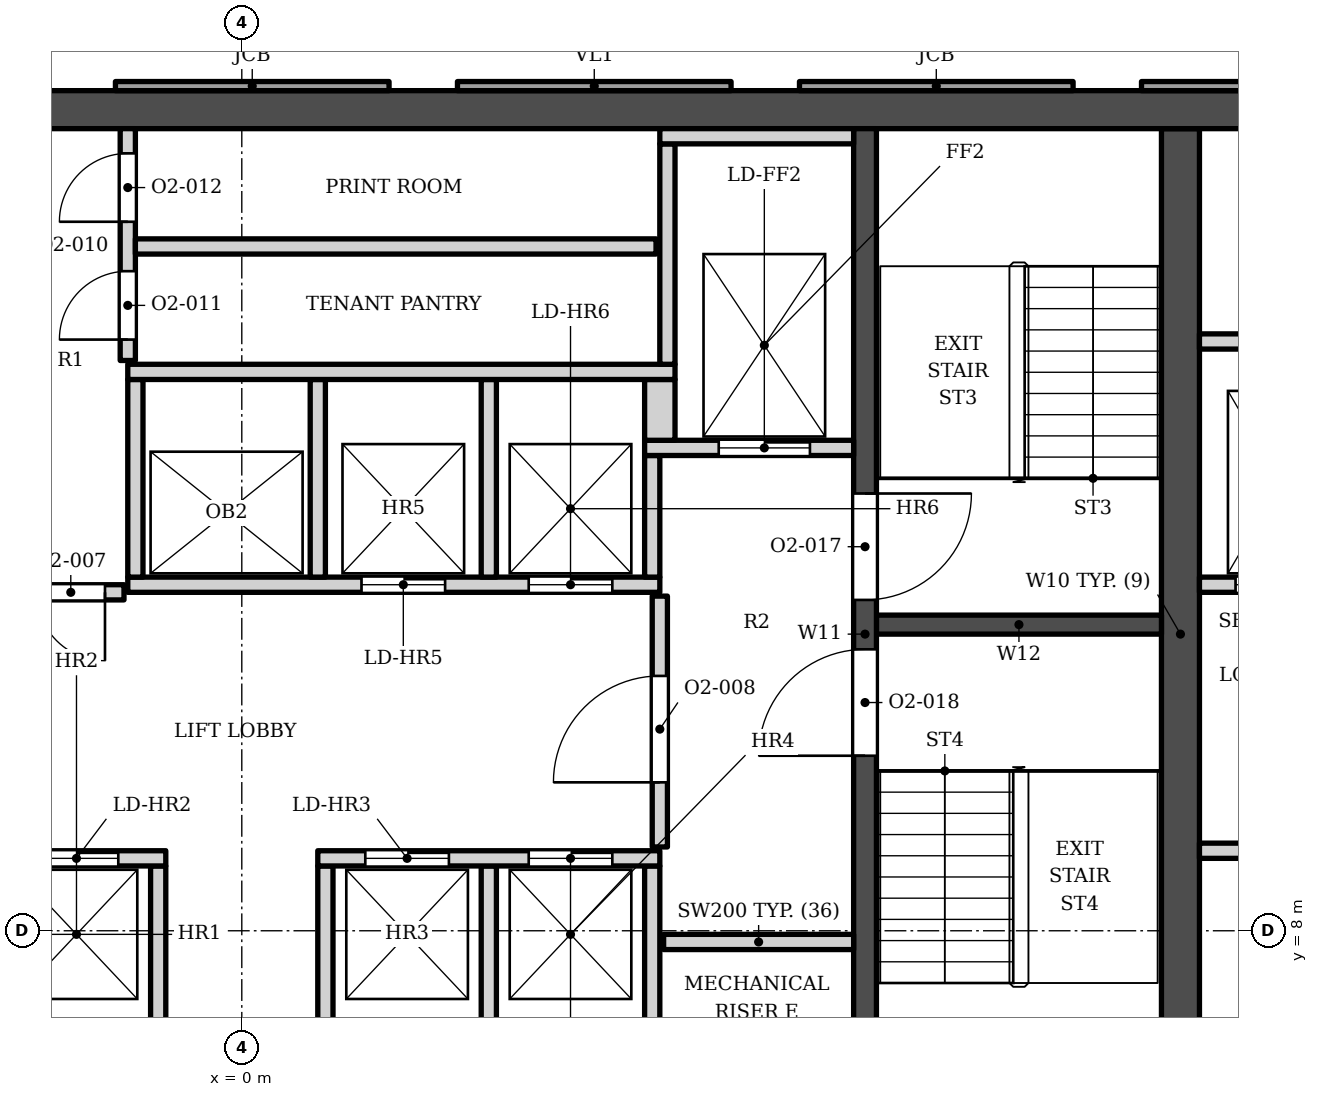
"""IFC4 building model, lengths in metres.
Left out: names, types, materials, properties, quantities, classifications, styles, units other than length and angle.
Written with IfcOpenShell. Run it as: python <this file> out.ifc"""

import sys

from ifc_helpers import new_model, si_unit, direction, frame, frame_2d, origin, place, context, subcontext, project, spatial, polyline, rectangle, outline, extrude, element, fill, save


model = new_model("IFC4")
c1 = context("Model", 3, precision=1e-05, world=origin(), true_north=direction((0.0, 1.0)))
c2 = subcontext(c1, "Body", "Model", "MODEL_VIEW")
j1 = project(units=[si_unit("LENGTHUNIT", "METRE"), si_unit("PLANEANGLEUNIT", "RADIAN")], contexts=[c1])
p1 = place(None, origin())
s1 = spatial("IfcSite", under=j1, at=p1, CompositionType="ELEMENT")
p2 = place(p1, origin())
s2 = spatial("IfcBuilding", under=s1, at=p2, CompositionType="ELEMENT")
p3 = place(p2, frame((0.0, 0.0, 156.3)))
s3 = spatial("IfcBuildingStorey", under=s2, at=p3, CompositionType="ELEMENT", Elevation=156.3)
p4 = place(p3, frame((-15.1, 18.802, 0.0), z_axis=(0.0, 0.0, 1.0), x_axis=(1.0, 0.0, 0.0)))
e1 = element("IfcWall", 1, at=p4, inside=s3, PredefinedType="SHEAR", context=c2, shape_type="SweptSolid", body=[
    extrude(rectangle(XDim=30.2, YDim=0.5, at=frame_2d((15.1, 0.0))), origin(), (0.0, 0.0, 1.0), 3.9),
])
p5 = place(p3, frame((12.35, 5.253, 0.0), z_axis=(0.0, 0.0, 1.0), x_axis=(0.0, 1.0, 0.0)))
e2 = element("IfcWall", 2, at=p5, inside=s3, PredefinedType="SHEAR", context=c2, shape_type="SweptSolid", body=[
    extrude(rectangle(XDim=13.3, YDim=0.5, at=frame_2d((6.65, 0.0))), origin(), (0.0, 0.0, 1.0), 3.9),
])
p6 = place(p3, frame((8.2, 5.253, 0.0), z_axis=(0.0, 0.0, 1.0), x_axis=(0.0, 1.0, 0.0)))
e3 = element("IfcWall", 3, at=p6, inside=s3, PredefinedType="SHEAR", context=c2, shape_type="SweptSolid", body=[
    extrude(rectangle(XDim=13.3, YDim=0.3, at=frame_2d((6.65, 0.0))), origin(), (0.0, 0.0, 1.0), 3.9),
])
p7 = place(p6, frame((7.1, 0.0, 0.0)))
e4 = element("IfcOpeningElement", 4, at=p7, cuts=e3, PredefinedType="OPENING", context=c2, shape_type="SweptSolid", body=[
    extrude(rectangle(XDim=1.4, YDim=2.1, at=frame_2d((0.7, 1.05))), frame((0.0, 0.16, 0.0), z_axis=(0.0, -1.0, 0.0), x_axis=(1.0, 0.0, 0.0)), (0.0, 0.0, 1.0), 0.32),
])
p8 = place(p6, frame((5.05, 0.0, 0.0)))
e5 = element("IfcOpeningElement", 5, at=p8, cuts=e3, PredefinedType="OPENING", context=c2, shape_type="SweptSolid", body=[
    extrude(rectangle(XDim=1.4, YDim=2.1, at=frame_2d((0.7, 1.05))), frame((0.0, 0.16, 0.0), z_axis=(0.0, -1.0, 0.0), x_axis=(1.0, 0.0, 0.0)), (0.0, 0.0, 1.0), 0.32),
])
p9 = place(p3, frame((8.35, 12.028, 0.0), z_axis=(0.0, 0.0, 1.0), x_axis=(1.0, 0.0, 0.0)))
e6 = element("IfcWall", 6, at=p9, inside=s3, PredefinedType="SHEAR", context=c2, shape_type="SweptSolid", body=[
    extrude(rectangle(XDim=3.75, YDim=0.25, at=frame_2d((1.875, 0.0))), origin(), (0.0, 0.0, 1.0), 3.9),
])
p10 = place(p3, origin())
e7 = element("IfcWall", 7, at=p10, inside=s3, PredefinedType="ELEMENTEDWALL", context=c2, shape_type="SweptSolid", body=[
    extrude(outline(polyline([(11.837, 19.173), (11.837, 19.052), (15.437, 19.052), (15.437, 19.173), (11.837, 19.173)])), origin(), (0.0, 0.0, 1.0), 3.0),
])
p11 = place(p3, origin())
e8 = element("IfcWall", 8, at=p11, inside=s3, PredefinedType="SOLIDWALL", context=c2, shape_type="SweptSolid", body=[
    extrude(outline(polyline([(7.337, 19.173), (7.337, 19.052), (10.938, 19.052), (10.938, 19.173), (7.337, 19.173)])), origin(), (0.0, 0.0, 1.0), 3.0),
])
p12 = place(p3, origin())
e9 = element("IfcWall", 9, at=p12, inside=s3, PredefinedType="ELEMENTEDWALL", context=c2, shape_type="SweptSolid", body=[
    extrude(outline(polyline([(2.837, 19.173), (2.837, 19.052), (6.438, 19.052), (6.438, 19.173), (2.837, 19.173)])), origin(), (0.0, 0.0, 1.0), 3.0),
])
p13 = place(p3, origin())
e10 = element("IfcWall", 10, at=p13, inside=s3, PredefinedType="SOLIDWALL", context=c2, shape_type="SweptSolid", body=[
    extrude(outline(polyline([(-1.663, 19.173), (-1.663, 19.052), (1.938, 19.052), (1.938, 19.173), (-1.663, 19.173)])), origin(), (0.0, 0.0, 1.0), 3.0),
])
for number, where, z_axis, x_axis in (
    (11, (-1.1, 6.353, 0.0), (0.0, 0.0, 1.0), (0.0, 1.0, 0.0)),
    (12, (1.1, 6.353, 0.0), (0.0, 0.0, 1.0), (0.0, 1.0, 0.0)),
    (13, (3.25, 6.353, 0.0), (0.0, 0.0, 1.0), (0.0, 1.0, 0.0)),
    (14, (5.4, 6.353, 0.0), (0.0, 0.0, 1.0), (0.0, 1.0, 0.0)),
    (15, (5.55, 7.853, 0.0), (0.0, 0.0, 1.0), (1.0, 0.0, 0.0)),
):
    element("IfcWall", number, at=place(p3, frame(where, z_axis=z_axis, x_axis=x_axis)), inside=s3, PredefinedType="SOLIDWALL", context=c2, shape_type="SweptSolid", body=[
        extrude(rectangle(XDim=2.5, YDim=0.2, at=frame_2d((1.25, 0.0))), origin(), (0.0, 0.0, 1.0), 3.73),
    ])
p14 = place(p3, frame((-5.5, 8.953, 0.0), z_axis=(0.0, 0.0, 1.0), x_axis=(1.0, 0.0, 0.0)))
e16 = element("IfcWall", 16, at=p14, inside=s3, PredefinedType="SOLIDWALL", context=c2, shape_type="SweptSolid", body=[
    extrude(rectangle(XDim=4.5, YDim=0.2, at=frame_2d((2.25, 0.0))), origin(), (0.0, 0.0, 1.0), 3.73),
])
p15 = place(p14, frame((0.625, 0.0, 0.0)))
e17 = element("IfcOpeningElement", 17, at=p15, cuts=e16, PredefinedType="OPENING", context=c2, shape_type="SweptSolid", body=[
    extrude(rectangle(XDim=1.1, YDim=2.1, at=frame_2d((0.55, 1.05))), frame((0.0, 0.11, 0.0), z_axis=(0.0, -1.0, 0.0), x_axis=(1.0, 0.0, 0.0)), (0.0, 0.0, 1.0), 0.22),
])
p16 = place(p14, frame((2.775, 0.0, 0.0)))
e18 = element("IfcOpeningElement", 18, at=p16, cuts=e16, PredefinedType="OPENING", context=c2, shape_type="SweptSolid", body=[
    extrude(rectangle(XDim=1.1, YDim=2.1, at=frame_2d((0.55, 1.05))), frame((0.0, 0.11, 0.0), z_axis=(0.0, -1.0, 0.0), x_axis=(1.0, 0.0, 0.0)), (0.0, 0.0, 1.0), 0.22),
])
p17 = place(p3, frame((1.0, 8.953, 0.0), z_axis=(0.0, 0.0, 1.0), x_axis=(1.0, 0.0, 0.0)))
e19 = element("IfcWall", 19, at=p17, inside=s3, PredefinedType="SOLIDWALL", context=c2, shape_type="SweptSolid", body=[
    extrude(rectangle(XDim=4.5, YDim=0.2, at=frame_2d((2.25, 0.0))), origin(), (0.0, 0.0, 1.0), 3.73),
])
p18 = place(p17, frame((0.625, 0.0, 0.0)))
e20 = element("IfcOpeningElement", 20, at=p18, cuts=e19, PredefinedType="OPENING", context=c2, shape_type="SweptSolid", body=[
    extrude(rectangle(XDim=1.1, YDim=2.1, at=frame_2d((0.55, 1.05))), frame((0.0, 0.11, 0.0), z_axis=(0.0, -1.0, 0.0), x_axis=(1.0, 0.0, 0.0)), (0.0, 0.0, 1.0), 0.22),
])
p19 = place(p17, frame((2.775, 0.0, 0.0)))
e21 = element("IfcOpeningElement", 21, at=p19, cuts=e19, PredefinedType="OPENING", context=c2, shape_type="SweptSolid", body=[
    extrude(rectangle(XDim=1.1, YDim=2.1, at=frame_2d((0.55, 1.05))), frame((0.0, 0.11, 0.0), z_axis=(0.0, -1.0, 0.0), x_axis=(1.0, 0.0, 0.0)), (0.0, 0.0, 1.0), 0.22),
])
p20 = place(p3, frame((12.6, 9.052, 0.0), z_axis=(0.0, 0.0, 1.0), x_axis=(1.0, 0.0, 0.0)))
e22 = element("IfcWall", 22, at=p20, inside=s3, PredefinedType="PARTITIONING", context=c2, shape_type="SweptSolid", body=[
    extrude(rectangle(XDim=2.5, YDim=0.2, at=frame_2d((1.25, 0.0))), origin(), (0.0, 0.0, 1.0), 3.73),
])
p21 = place(p3, frame((5.5, 9.103, 0.0), z_axis=(0.0, 0.0, 1.0), x_axis=(0.0, 1.0, 0.0)))
e23 = element("IfcWall", 23, at=p21, inside=s3, PredefinedType="SOLIDWALL", context=c2, shape_type="SweptSolid", body=[
    extrude(rectangle(XDim=3.3, YDim=0.2, at=frame_2d((1.65, 0.0))), origin(), (0.0, 0.0, 1.0), 3.73),
])
p22 = place(p21, frame((0.85, 0.0, 0.0)))
e24 = element("IfcOpeningElement", 24, at=p22, cuts=e23, PredefinedType="OPENING", context=c2, shape_type="SweptSolid", body=[
    extrude(rectangle(XDim=1.4, YDim=2.1, at=frame_2d((0.7, 1.05))), frame((0.0, 0.11, 0.0), z_axis=(0.0, -1.0, 0.0), x_axis=(1.0, 0.0, 0.0)), (0.0, 0.0, 1.0), 0.22),
])
p23 = place(p3, frame((-2.95, 12.453, 0.0), z_axis=(0.0, 0.0, 1.0), x_axis=(1.0, 0.0, 0.0)))
e25 = element("IfcWall", 25, at=p23, inside=s3, PredefinedType="SOLIDWALL", context=c2, shape_type="SweptSolid", body=[
    extrude(rectangle(XDim=1.4, YDim=0.2, at=frame_2d((0.7, 0.0))), origin(), (0.0, 0.0, 1.0), 3.73),
])
p24 = place(p23, frame((0.25, 0.0, 0.0)))
e26 = element("IfcOpeningElement", 26, at=p24, cuts=e25, PredefinedType="OPENING", context=c2, shape_type="SweptSolid", body=[
    extrude(rectangle(XDim=0.9, YDim=2.1, at=frame_2d((0.45, 1.05))), frame((0.0, 0.11, 0.0), z_axis=(0.0, -1.0, 0.0), x_axis=(1.0, 0.0, 0.0)), (0.0, 0.0, 1.0), 0.22),
])
p25 = place(p3, frame((-1.5, 12.552, 0.0), z_axis=(0.0, 0.0, 1.0), x_axis=(1.0, 0.0, 0.0)))
e27 = element("IfcWall", 27, at=p25, inside=s3, PredefinedType="SOLIDWALL", context=c2, shape_type="SweptSolid", body=[
    extrude(rectangle(XDim=7.0, YDim=0.2, at=frame_2d((3.5, 0.0))), origin(), (0.0, 0.0, 1.0), 3.73),
])
p26 = place(p25, frame((3.075, 0.0, 0.0)))
e28 = element("IfcOpeningElement", 28, at=p26, cuts=e27, PredefinedType="OPENING", context=c2, shape_type="SweptSolid", body=[
    extrude(rectangle(XDim=1.1, YDim=2.1, at=frame_2d((0.55, 1.05))), frame((0.0, 0.11, 0.0), z_axis=(0.0, -1.0, 0.0), x_axis=(1.0, 0.0, 0.0)), (0.0, 0.0, 1.0), 0.22),
])
p27 = place(p25, frame((5.275, 0.0, 0.0)))
e29 = element("IfcOpeningElement", 29, at=p27, cuts=e27, PredefinedType="OPENING", context=c2, shape_type="SweptSolid", body=[
    extrude(rectangle(XDim=1.1, YDim=2.1, at=frame_2d((0.55, 1.05))), frame((0.0, 0.11, 0.0), z_axis=(0.0, -1.0, 0.0), x_axis=(1.0, 0.0, 0.0)), (0.0, 0.0, 1.0), 0.22),
])
p28 = place(p3, frame((12.6, 12.552, 0.0), z_axis=(0.0, 0.0, 1.0), x_axis=(1.0, 0.0, 0.0)))
e30 = element("IfcWall", 30, at=p28, inside=s3, PredefinedType="SOLIDWALL", context=c2, shape_type="SweptSolid", body=[
    extrude(rectangle(XDim=2.15, YDim=0.2, at=frame_2d((1.075, 0.0))), origin(), (0.0, 0.0, 1.0), 3.73),
])
p29 = place(p28, frame((0.475, 0.0, 0.0)))
e31 = element("IfcOpeningElement", 31, at=p29, cuts=e30, PredefinedType="OPENING", context=c2, shape_type="SweptSolid", body=[
    extrude(rectangle(XDim=1.2, YDim=2.1, at=frame_2d((0.6, 1.05))), frame((0.0, 0.11, 0.0), z_axis=(0.0, -1.0, 0.0), x_axis=(1.0, 0.0, 0.0)), (0.0, 0.0, 1.0), 0.22),
])
for number, where, z_axis, x_axis in (
    (32, (-1.4, 12.653, 0.0), (0.0, 0.0, 1.0), (0.0, 1.0, 0.0)),
    (33, (1.0, 12.653, 0.0), (0.0, 0.0, 1.0), (0.0, 1.0, 0.0)),
    (34, (3.25, 12.653, 0.0), (0.0, 0.0, 1.0), (0.0, 1.0, 0.0)),
):
    element("IfcWall", number, at=place(p3, frame(where, z_axis=z_axis, x_axis=x_axis)), inside=s3, PredefinedType="SOLIDWALL", context=c2, shape_type="SweptSolid", body=[
        extrude(rectangle(XDim=2.6, YDim=0.2, at=frame_2d((1.3, 0.0))), origin(), (0.0, 0.0, 1.0), 3.73),
    ])
p30 = place(p3, frame((5.4, 12.653, 0.0), z_axis=(0.0, 0.0, 1.0), x_axis=(0.0, 1.0, 0.0)))
e35 = element("IfcWall", 35, at=p30, inside=s3, PredefinedType="SOLIDWALL", context=c2, shape_type="SweptSolid", body=[
    extrude(rectangle(XDim=1.6, YDim=0.2, at=frame_2d((0.8, 0.0))), origin(), (0.0, 0.0, 1.0), 3.73),
])
p31 = place(p3, frame((5.3, 14.353, 0.0), z_axis=(0.0, 0.0, 1.0), x_axis=(1.0, 0.0, 0.0)))
e36 = element("IfcWall", 36, at=p31, inside=s3, PredefinedType="SOLIDWALL", context=c2, shape_type="SweptSolid", body=[
    extrude(rectangle(XDim=2.75, YDim=0.2, at=frame_2d((1.375, 0.0))), origin(), (0.0, 0.0, 1.0), 3.73),
])
p32 = place(p31, frame((0.975, 0.0, 0.0)))
e37 = element("IfcOpeningElement", 37, at=p32, cuts=e36, PredefinedType="OPENING", context=c2, shape_type="SweptSolid", body=[
    extrude(rectangle(XDim=1.2, YDim=2.1, at=frame_2d((0.6, 1.05))), frame((0.0, 0.11, 0.0), z_axis=(0.0, -1.0, 0.0), x_axis=(1.0, 0.0, 0.0)), (0.0, 0.0, 1.0), 0.22),
])
p33 = place(p3, frame((5.5, 14.453, 0.0), z_axis=(0.0, 0.0, 1.0), x_axis=(0.0, 1.0, 0.0)))
e38 = element("IfcWall", 38, at=p33, inside=s3, PredefinedType="SOLIDWALL", context=c2, shape_type="SweptSolid", body=[
    extrude(rectangle(XDim=0.8, YDim=0.4, at=frame_2d((0.4, 0.0))), origin(), (0.0, 0.0, 1.0), 3.73),
])
p34 = place(p3, frame((-1.5, 15.353, 0.0), z_axis=(0.0, 0.0, 1.0), x_axis=(1.0, 0.0, 0.0)))
e39 = element("IfcWall", 39, at=p34, inside=s3, PredefinedType="SOLIDWALL", context=c2, shape_type="SweptSolid", body=[
    extrude(rectangle(XDim=7.2, YDim=0.2, at=frame_2d((3.6, 0.0))), origin(), (0.0, 0.0, 1.0), 3.73),
])
p35 = place(p3, frame((5.6, 15.453, 0.0), z_axis=(0.0, 0.0, 1.0), x_axis=(0.0, 1.0, 0.0)))
e40 = element("IfcWall", 40, at=p35, inside=s3, PredefinedType="SOLIDWALL", context=c2, shape_type="SweptSolid", body=[
    extrude(rectangle(XDim=2.9, YDim=0.2, at=frame_2d((1.45, 0.0))), origin(), (0.0, 0.0, 1.0), 3.73),
])
p36 = place(p3, frame((-1.5, 15.503, 0.0), z_axis=(0.0, 0.0, 1.0), x_axis=(0.0, 1.0, 0.0)))
e41 = element("IfcWall", 41, at=p36, inside=s3, PredefinedType="SOLIDWALL", context=c2, shape_type="SweptSolid", body=[
    extrude(rectangle(XDim=3.05, YDim=0.2, at=frame_2d((1.525, 0.0))), origin(), (0.0, 0.0, 1.0), 3.73),
])
p37 = place(p36, frame((0.275, 0.0, 0.0)))
e42 = element("IfcOpeningElement", 42, at=p37, cuts=e41, PredefinedType="OPENING", context=c2, shape_type="SweptSolid", body=[
    extrude(rectangle(XDim=0.9, YDim=2.1, at=frame_2d((0.45, 1.05))), frame((0.0, 0.11, 0.0), z_axis=(0.0, -1.0, 0.0), x_axis=(1.0, 0.0, 0.0)), (0.0, 0.0, 1.0), 0.22),
])
p38 = place(p36, frame((1.825, 0.0, 0.0)))
e43 = element("IfcOpeningElement", 43, at=p38, cuts=e41, PredefinedType="OPENING", context=c2, shape_type="SweptSolid", body=[
    extrude(rectangle(XDim=0.9, YDim=2.1, at=frame_2d((0.45, 1.05))), frame((0.0, 0.11, 0.0), z_axis=(0.0, -1.0, 0.0), x_axis=(1.0, 0.0, 0.0)), (0.0, 0.0, 1.0), 0.22),
])
p39 = place(p3, frame((12.6, 15.753, 0.0), z_axis=(0.0, 0.0, 1.0), x_axis=(1.0, 0.0, 0.0)))
e44 = element("IfcWall", 44, at=p39, inside=s3, PredefinedType="SOLIDWALL", context=c2, shape_type="SweptSolid", body=[
    extrude(rectangle(XDim=2.15, YDim=0.2, at=frame_2d((1.075, 0.0))), origin(), (0.0, 0.0, 1.0), 3.73),
])
p40 = place(p3, frame((-1.4, 17.003, 0.0), z_axis=(0.0, 0.0, 1.0), x_axis=(1.0, 0.0, 0.0)))
e45 = element("IfcWall", 45, at=p40, inside=s3, PredefinedType="SOLIDWALL", context=c2, shape_type="SweptSolid", body=[
    extrude(rectangle(XDim=6.85, YDim=0.2, at=frame_2d((3.425, 0.0))), origin(), (0.0, 0.0, 1.0), 3.73),
])
p41 = place(p3, frame((5.5, 18.453, 0.0), z_axis=(0.0, 0.0, 1.0), x_axis=(1.0, 0.0, 0.0)))
e46 = element("IfcWall", 46, at=p41, inside=s3, PredefinedType="SOLIDWALL", context=c2, shape_type="SweptSolid", body=[
    extrude(rectangle(XDim=2.55, YDim=0.2, at=frame_2d((1.275, 0.0))), origin(), (0.0, 0.0, 1.0), 3.73),
])
p42 = place(p16, origin())
e47 = element("IfcDoor", 47, at=p42, inside=s3, OperationType="DOUBLE_DOOR_SLIDING", PredefinedType="DOOR", context=c2, shape_type="SweptSolid", body=[
    extrude(rectangle(XDim=1.1, YDim=2.1, at=frame_2d((0.55, 1.05))), frame((0.0, 0.025, 0.0), z_axis=(0.0, -1.0, 0.0), x_axis=(1.0, 0.0, 0.0)), (0.0, 0.0, 1.0), 0.05),
])
fill(e18, e47)
p43 = place(p18, origin())
e48 = element("IfcDoor", 48, at=p43, inside=s3, OperationType="DOUBLE_DOOR_SLIDING", PredefinedType="DOOR", context=c2, shape_type="SweptSolid", body=[
    extrude(rectangle(XDim=1.1, YDim=2.1, at=frame_2d((0.55, 1.05))), frame((0.0, 0.025, 0.0), z_axis=(0.0, -1.0, 0.0), x_axis=(1.0, 0.0, 0.0)), (0.0, 0.0, 1.0), 0.05),
])
fill(e20, e48)
p44 = place(p19, origin())
e49 = element("IfcDoor", 49, at=p44, inside=s3, OperationType="DOUBLE_DOOR_SLIDING", PredefinedType="DOOR", context=c2, shape_type="SweptSolid", body=[
    extrude(rectangle(XDim=1.1, YDim=2.1, at=frame_2d((0.55, 1.05))), frame((0.0, 0.025, 0.0), z_axis=(0.0, -1.0, 0.0), x_axis=(1.0, 0.0, 0.0)), (0.0, 0.0, 1.0), 0.05),
])
fill(e21, e49)
p45 = place(p26, origin())
e50 = element("IfcDoor", 50, at=p45, inside=s3, OperationType="DOUBLE_DOOR_SLIDING", PredefinedType="DOOR", context=c2, shape_type="SweptSolid", body=[
    extrude(rectangle(XDim=1.1, YDim=2.1, at=frame_2d((0.55, 1.05))), frame((0.0, 0.025, 0.0), z_axis=(0.0, -1.0, 0.0), x_axis=(1.0, 0.0, 0.0)), (0.0, 0.0, 1.0), 0.05),
])
fill(e28, e50)
p46 = place(p27, origin())
e51 = element("IfcDoor", 51, at=p46, inside=s3, OperationType="DOUBLE_DOOR_SLIDING", PredefinedType="DOOR", context=c2, shape_type="SweptSolid", body=[
    extrude(rectangle(XDim=1.1, YDim=2.1, at=frame_2d((0.55, 1.05))), frame((0.0, 0.025, 0.0), z_axis=(0.0, -1.0, 0.0), x_axis=(1.0, 0.0, 0.0)), (0.0, 0.0, 1.0), 0.05),
])
fill(e29, e51)
p47 = place(p32, origin())
e52 = element("IfcDoor", 52, at=p47, inside=s3, OperationType="DOUBLE_DOOR_SLIDING", PredefinedType="DOOR", context=c2, shape_type="SweptSolid", body=[
    extrude(rectangle(XDim=1.2, YDim=2.1, at=frame_2d((0.6, 1.05))), frame((0.0, 0.025, 0.0), z_axis=(0.0, -1.0, 0.0), x_axis=(1.0, 0.0, 0.0)), (0.0, 0.0, 1.0), 0.05),
])
fill(e37, e52)
p48 = place(p29, origin())
e53 = element("IfcDoor", 53, at=p48, inside=s3, OperationType="DOUBLE_DOOR_SLIDING", PredefinedType="DOOR", context=c2, shape_type="SweptSolid", body=[
    extrude(rectangle(XDim=1.2, YDim=2.1, at=frame_2d((0.6, 1.05))), frame((0.0, 0.025, 0.0), z_axis=(0.0, -1.0, 0.0), x_axis=(1.0, 0.0, 0.0)), (0.0, 0.0, 1.0), 0.05),
])
fill(e31, e53)
p49 = place(p7, origin())
e54 = element("IfcDoor", 54, at=p49, inside=s3, OperationType="SINGLE_SWING_RIGHT", PredefinedType="DOOR", context=c2, shape_type="SweptSolid", body=[
    extrude(rectangle(XDim=1.4, YDim=2.1, at=frame_2d((0.7, 1.05))), frame((0.0, 0.025, 0.0), z_axis=(0.0, -1.0, 0.0), x_axis=(1.0, 0.0, 0.0)), (0.0, 0.0, 1.0), 0.05),
])
fill(e4, e54)
p50 = place(p8, origin())
e55 = element("IfcDoor", 55, at=p50, inside=s3, OperationType="SINGLE_SWING_LEFT", PredefinedType="DOOR", context=c2, shape_type="SweptSolid", body=[
    extrude(rectangle(XDim=1.4, YDim=2.1, at=frame_2d((0.7, 1.05))), frame((0.0, 0.025, 0.0), z_axis=(0.0, -1.0, 0.0), x_axis=(1.0, 0.0, 0.0)), (0.0, 0.0, 1.0), 0.05),
])
fill(e5, e55)
p51 = place(p24, origin())
e56 = element("IfcDoor", 56, at=p51, inside=s3, OperationType="SINGLE_SWING_RIGHT", PredefinedType="DOOR", context=c2, shape_type="SweptSolid", body=[
    extrude(rectangle(XDim=0.9, YDim=2.1, at=frame_2d((0.45, 1.05))), frame((0.0, 0.025, 0.0), z_axis=(0.0, -1.0, 0.0), x_axis=(1.0, 0.0, 0.0)), (0.0, 0.0, 1.0), 0.05),
])
fill(e26, e56)
p52 = place(p22, origin())
e57 = element("IfcDoor", 57, at=p52, inside=s3, OperationType="SINGLE_SWING_LEFT", PredefinedType="DOOR", context=c2, shape_type="SweptSolid", body=[
    extrude(rectangle(XDim=1.4, YDim=2.1, at=frame_2d((0.7, 1.05))), frame((0.0, 0.025, 0.0), z_axis=(0.0, -1.0, 0.0), x_axis=(1.0, 0.0, 0.0)), (0.0, 0.0, 1.0), 0.05),
])
fill(e24, e57)
p53 = place(p37, origin())
e58 = element("IfcDoor", 58, at=p53, inside=s3, OperationType="SINGLE_SWING_LEFT", PredefinedType="DOOR", context=c2, shape_type="SweptSolid", body=[
    extrude(rectangle(XDim=0.9, YDim=2.1, at=frame_2d((0.45, 1.05))), frame((0.0, 0.025, 0.0), z_axis=(0.0, -1.0, 0.0), x_axis=(1.0, 0.0, 0.0)), (0.0, 0.0, 1.0), 0.05),
])
fill(e42, e58)
p54 = place(p38, origin())
e59 = element("IfcDoor", 59, at=p54, inside=s3, OperationType="SINGLE_SWING_LEFT", PredefinedType="DOOR", context=c2, shape_type="SweptSolid", body=[
    extrude(rectangle(XDim=0.9, YDim=2.1, at=frame_2d((0.45, 1.05))), frame((0.0, 0.025, 0.0), z_axis=(0.0, -1.0, 0.0), x_axis=(1.0, 0.0, 0.0)), (0.0, 0.0, 1.0), 0.05),
])
fill(e43, e59)
save(model, sys.argv[1])
